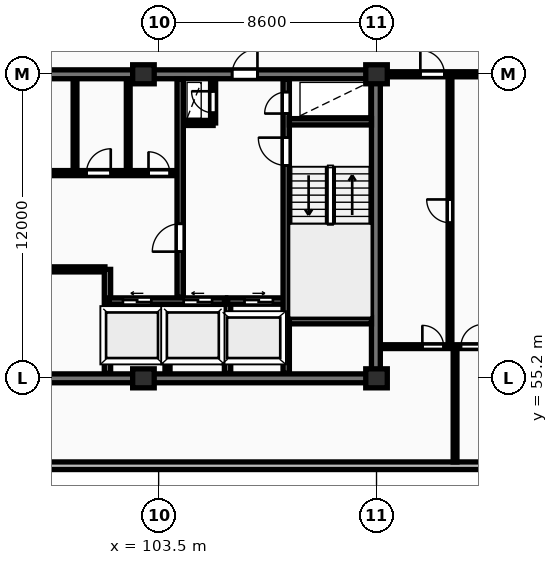
"""IFC4 building model, lengths in metres.
Left out: names, types, materials, properties, quantities, classifications, styles, units other than length and angle.
Written with IfcOpenShell. Run it as: python <this file> out.ifc"""

import sys

from ifc_helpers import new_model, si_unit, direction, frame, frame_2d, origin, origin_2d, place, context, subcontext, project, spatial, rectangle, extrude, element, fill, save


model = new_model("IFC4")
c1 = context("Model", 3, precision=1e-05, world=origin(), true_north=direction((0.0, 1.0)))
c2 = subcontext(c1, "Body", "Model", "MODEL_VIEW")
j1 = project(units=[si_unit("LENGTHUNIT", "METRE"), si_unit("PLANEANGLEUNIT", "RADIAN")], contexts=[c1])
p1 = place(None, origin())
s1 = spatial("IfcSite", under=j1, at=p1, CompositionType="ELEMENT")
p2 = place(p1, origin())
s2 = spatial("IfcBuilding", under=s1, at=p2, CompositionType="ELEMENT")
p3 = place(p2, frame((0.0, 0.0, 210.85)))
s3 = spatial("IfcBuildingStorey", under=s2, at=p3, CompositionType="ELEMENT", Elevation=210.85)
for number, where, z_axis, x_axis in (
    (1, (102.9, 55.2, 0.0), (0.0, 0.0, 1.0), (1.0, 0.0, 0.0)),
    (2, (102.9, 67.2, 0.0), (0.0, 0.0, 1.0), (1.0, 0.0, 0.0)),
    (3, (112.1, 55.2, 0.0), (0.0, 0.0, 1.0), (1.0, 0.0, 0.0)),
    (4, (112.1, 67.2, 0.0), (0.0, 0.0, 1.0), (1.0, 0.0, 0.0)),
):
    element("IfcColumn", number, at=place(p3, frame(where, z_axis=z_axis, x_axis=x_axis)), inside=s3, PredefinedType="COLUMN", context=c2, shape_type="SweptSolid", body=[
        extrude(rectangle(XDim=0.85, YDim=0.75, at=origin_2d()), origin(), (0.0, 0.0, 1.0), 3.25),
    ])
p4 = place(p3, frame((59.8, 51.75, 0.0), z_axis=(0.0, 0.0, 1.0), x_axis=(1.0, 0.0, 0.0)))
e5 = element("IfcWall", 5, at=p4, inside=s3, PredefinedType="STANDARD", context=c2, shape_type="SweptSolid", body=[
    extrude(rectangle(XDim=68.6, YDim=0.3, at=frame_2d((34.3, 0.0))), origin(), (0.0, 0.0, 1.0), 2.97),
])
p5 = place(p4, frame((13.025, 0.0, 0.85)))
e6 = element("IfcOpeningElement", 6, at=p5, cuts=e5, PredefinedType="OPENING", context=c2, shape_type="SweptSolid", body=[
    extrude(rectangle(XDim=1.8, YDim=1.8, at=frame_2d((0.9, 0.9))), frame((0.0, 0.16, 0.0), z_axis=(0.0, -1.0, 0.0), x_axis=(1.0, 0.0, 0.0)), (0.0, 0.0, 1.0), 0.32),
])
p6 = place(p4, frame((56.375, 0.0, 0.85)))
e7 = element("IfcOpeningElement", 7, at=p6, cuts=e5, PredefinedType="OPENING", context=c2, shape_type="SweptSolid", body=[
    extrude(rectangle(XDim=1.8, YDim=1.8, at=frame_2d((0.9, 0.9))), frame((0.0, 0.16, 0.0), z_axis=(0.0, -1.0, 0.0), x_axis=(1.0, 0.0, 0.0)), (0.0, 0.0, 1.0), 0.32),
])
p7 = place(p3, frame((75.95, 55.2, 0.0), z_axis=(0.0, 0.0, 1.0), x_axis=(1.0, 0.0, 0.0)))
e8 = element("IfcWall", 8, at=p7, inside=s3, PredefinedType="SHEAR", context=c2, shape_type="SweptSolid", body=[
    extrude(rectangle(XDim=36.3, YDim=0.35, at=frame_2d((18.15, 0.0))), origin(), (0.0, 0.0, 1.0), 3.25),
])
p8 = place(p3, frame((112.075, 55.375, 0.0), z_axis=(0.0, 0.0, 1.0), x_axis=(0.0, 1.0, 0.0)))
e9 = element("IfcWall", 9, at=p8, inside=s3, PredefinedType="SHEAR", context=c2, shape_type="SweptSolid", body=[
    extrude(rectangle(XDim=11.65, YDim=0.35, at=frame_2d((5.825, 0.0))), origin(), (0.0, 0.0, 1.0), 3.25),
])
p9 = place(p3, frame((75.95, 67.2, 0.0), z_axis=(0.0, 0.0, 1.0), x_axis=(1.0, 0.0, 0.0)))
e10 = element("IfcWall", 10, at=p9, inside=s3, PredefinedType="SHEAR", context=c2, shape_type="SweptSolid", body=[
    extrude(rectangle(XDim=36.3, YDim=0.35, at=frame_2d((18.15, 0.0))), origin(), (0.0, 0.0, 1.0), 3.25),
])
p10 = place(p9, frame((5.25, 0.0, 0.0)))
e11 = element("IfcOpeningElement", 11, at=p10, cuts=e10, PredefinedType="OPENING", context=c2, shape_type="SweptSolid", body=[
    extrude(rectangle(XDim=1.0, YDim=2.15, at=frame_2d((0.5, 1.075))), frame((0.0, 0.185, 0.0), z_axis=(0.0, -1.0, 0.0), x_axis=(1.0, 0.0, 0.0)), (0.0, 0.0, 1.0), 0.37),
])
p11 = place(p9, frame((21.6, 0.0, 0.0)))
e12 = element("IfcOpeningElement", 12, at=p11, cuts=e10, PredefinedType="OPENING", context=c2, shape_type="SweptSolid", body=[
    extrude(rectangle(XDim=1.5, YDim=2.2, at=frame_2d((0.75, 1.1))), frame((0.0, 0.185, 0.0), z_axis=(0.0, -1.0, 0.0), x_axis=(1.0, 0.0, 0.0)), (0.0, 0.0, 1.0), 0.37),
])
p12 = place(p9, frame((30.45, 0.0, 0.0)))
e13 = element("IfcOpeningElement", 13, at=p12, cuts=e10, PredefinedType="OPENING", context=c2, shape_type="SweptSolid", body=[
    extrude(rectangle(XDim=1.0, YDim=2.15, at=frame_2d((0.5, 1.075))), frame((0.0, 0.185, 0.0), z_axis=(0.0, -1.0, 0.0), x_axis=(1.0, 0.0, 0.0)), (0.0, 0.0, 1.0), 0.37),
])
p13 = place(p3, frame((93.02, 59.5, 0.0), z_axis=(0.0, 0.0, 1.0), x_axis=(1.0, 0.0, 0.0)))
e14 = element("IfcWall", 14, at=p13, inside=s3, PredefinedType="PARTITIONING", context=c2, shape_type="SweptSolid", body=[
    extrude(rectangle(XDim=8.36, YDim=0.2, at=frame_2d((4.18, 0.0))), origin(), (0.0, 0.0, 1.0), 2.97),
])
p14 = place(p13, frame((3.4, 0.0, 0.0)))
e15 = element("IfcOpeningElement", 15, at=p14, cuts=e14, PredefinedType="OPENING", context=c2, shape_type="SweptSolid", body=[
    extrude(rectangle(XDim=0.92, YDim=2.08, at=frame_2d((0.46, 1.04))), frame((0.0, 0.11, 0.0), z_axis=(0.0, -1.0, 0.0), x_axis=(1.0, 0.0, 0.0)), (0.0, 0.0, 1.0), 0.22),
])
p15 = place(p3, frame((101.48, 55.4, 0.0), z_axis=(0.0, 0.0, 1.0), x_axis=(0.0, 1.0, 0.0)))
e16 = element("IfcWall", 16, at=p15, inside=s3, PredefinedType="SHEAR", context=c2, shape_type="SweptSolid", body=[
    extrude(rectangle(XDim=4.1, YDim=0.25, at=frame_2d((2.05, 0.0))), origin(), (0.0, 0.0, 1.0), 3.25),
])
p16 = place(p3, frame((103.85, 55.4, 0.0), z_axis=(0.0, 0.0, 1.0), x_axis=(0.0, 1.0, 0.0)))
e17 = element("IfcWall", 17, at=p16, inside=s3, PredefinedType="PARTITIONING", context=c2, shape_type="SweptSolid", body=[
    extrude(rectangle(XDim=2.72, YDim=0.2, at=frame_2d((1.36, 0.0))), origin(), (0.0, 0.0, 1.0), 2.97),
])
p17 = place(p3, frame((101.55, 58.25, 0.0), z_axis=(0.0, 0.0, 1.0), x_axis=(1.0, 0.0, 0.0)))
e18 = element("IfcWall", 18, at=p17, inside=s3, PredefinedType="SHEAR", context=c2, shape_type="SweptSolid", body=[
    extrude(rectangle(XDim=4.6, YDim=0.25, at=frame_2d((2.3, 0.0))), origin(), (0.0, 0.0, 1.0), 3.25),
])
p18 = place(p17, frame((0.54, 0.0, 0.0)))
e19 = element("IfcOpeningElement", 19, at=p18, cuts=e18, PredefinedType="OPENING", context=c2, shape_type="SweptSolid", body=[
    extrude(rectangle(XDim=1.12, YDim=2.12, at=frame_2d((0.56, 1.06))), frame((0.0, 0.135, 0.0), z_axis=(0.0, -1.0, 0.0), x_axis=(1.0, 0.0, 0.0)), (0.0, 0.0, 1.0), 0.27),
])
p19 = place(p17, frame((2.94, 0.0, 0.0)))
e20 = element("IfcOpeningElement", 20, at=p19, cuts=e18, PredefinedType="OPENING", context=c2, shape_type="SweptSolid", body=[
    extrude(rectangle(XDim=1.12, YDim=2.12, at=frame_2d((0.56, 1.06))), frame((0.0, 0.135, 0.0), z_axis=(0.0, -1.0, 0.0), x_axis=(1.0, 0.0, 0.0)), (0.0, 0.0, 1.0), 0.27),
])
p20 = place(p3, frame((106.22, 55.4, 0.0), z_axis=(0.0, 0.0, 1.0), x_axis=(0.0, 1.0, 0.0)))
e21 = element("IfcWall", 21, at=p20, inside=s3, PredefinedType="SHEAR", context=c2, shape_type="SweptSolid", body=[
    extrude(rectangle(XDim=2.85, YDim=0.25, at=frame_2d((1.425, 0.0))), origin(), (0.0, 0.0, 1.0), 3.25),
])
p21 = place(p3, frame((106.22, 58.25, 0.0), z_axis=(0.0, 0.0, 1.0), x_axis=(1.0, 0.0, 0.0)))
e22 = element("IfcWall", 22, at=p21, inside=s3, PredefinedType="SHEAR", context=c2, shape_type="SweptSolid", body=[
    extrude(rectangle(XDim=2.46, YDim=0.25, at=frame_2d((1.23, 0.0))), origin(), (0.0, 0.0, 1.0), 3.25),
])
p22 = place(p21, frame((0.67, 0.0, 0.0)))
e23 = element("IfcOpeningElement", 23, at=p22, cuts=e22, PredefinedType="OPENING", context=c2, shape_type="SweptSolid", body=[
    extrude(rectangle(XDim=1.12, YDim=2.12, at=frame_2d((0.56, 1.06))), frame((0.0, 0.135, 0.0), z_axis=(0.0, -1.0, 0.0), x_axis=(1.0, 0.0, 0.0)), (0.0, 0.0, 1.0), 0.27),
])
for number, where, z_axis, x_axis in (
    (24, (102.3, 63.4, 0.0), (0.0, 0.0, 1.0), (0.0, 1.0, 0.0)),
    (25, (100.2, 63.4, 0.0), (0.0, 0.0, 1.0), (0.0, 1.0, 0.0)),
):
    element("IfcWall", number, at=place(p3, frame(where, z_axis=z_axis, x_axis=x_axis)), inside=s3, PredefinedType="PARTITIONING", context=c2, shape_type="SweptSolid", body=[
        extrude(rectangle(XDim=3.6, YDim=0.15, at=frame_2d((1.8, 0.0))), origin(), (0.0, 0.0, 1.0), 2.97),
    ])
p23 = place(p3, frame((84.42, 63.3, 0.0), z_axis=(0.0, 0.0, 1.0), x_axis=(1.0, 0.0, 0.0)))
e26 = element("IfcWall", 26, at=p23, inside=s3, PredefinedType="PARTITIONING", context=c2, shape_type="SweptSolid", body=[
    extrude(rectangle(XDim=19.83, YDim=0.2, at=frame_2d((9.915, 0.0))), origin(), (0.0, 0.0, 1.0), 2.97),
])
p24 = place(p23, frame((1.15, 0.0, 0.0)))
e27 = element("IfcOpeningElement", 27, at=p24, cuts=e26, PredefinedType="OPENING", context=c2, shape_type="SweptSolid", body=[
    extrude(rectangle(XDim=0.85, YDim=2.05, at=frame_2d((0.425, 1.025))), frame((0.0, 0.11, 0.0), z_axis=(0.0, -1.0, 0.0), x_axis=(1.0, 0.0, 0.0)), (0.0, 0.0, 1.0), 0.22),
])
p25 = place(p23, frame((3.25, 0.0, 0.0)))
e28 = element("IfcOpeningElement", 28, at=p25, cuts=e26, PredefinedType="OPENING", context=c2, shape_type="SweptSolid", body=[
    extrude(rectangle(XDim=0.85, YDim=2.05, at=frame_2d((0.425, 1.025))), frame((0.0, 0.11, 0.0), z_axis=(0.0, -1.0, 0.0), x_axis=(1.0, 0.0, 0.0)), (0.0, 0.0, 1.0), 0.22),
])
p26 = place(p23, frame((13.08, 0.0, 0.0)))
e29 = element("IfcOpeningElement", 29, at=p26, cuts=e26, PredefinedType="OPENING", context=c2, shape_type="SweptSolid", body=[
    extrude(rectangle(XDim=1.5, YDim=2.2, at=frame_2d((0.75, 1.1))), frame((0.0, 0.11, 0.0), z_axis=(0.0, -1.0, 0.0), x_axis=(1.0, 0.0, 0.0)), (0.0, 0.0, 1.0), 0.22),
])
p27 = place(p23, frame((5.53, 0.0, 0.0)))
e30 = element("IfcOpeningElement", 30, at=p27, cuts=e26, PredefinedType="OPENING", context=c2, shape_type="SweptSolid", body=[
    extrude(rectangle(XDim=0.88, YDim=2.06, at=frame_2d((0.44, 1.03))), frame((0.0, 0.11, 0.0), z_axis=(0.0, -1.0, 0.0), x_axis=(1.0, 0.0, 0.0)), (0.0, 0.0, 1.0), 0.22),
])
p28 = place(p23, frame((7.68, 0.0, 0.0)))
e31 = element("IfcOpeningElement", 31, at=p28, cuts=e26, PredefinedType="OPENING", context=c2, shape_type="SweptSolid", body=[
    extrude(rectangle(XDim=0.88, YDim=2.06, at=frame_2d((0.44, 1.03))), frame((0.0, 0.11, 0.0), z_axis=(0.0, -1.0, 0.0), x_axis=(1.0, 0.0, 0.0)), (0.0, 0.0, 1.0), 0.22),
])
p29 = place(p23, frame((10.43, 0.0, 0.0)))
e32 = element("IfcOpeningElement", 32, at=p29, cuts=e26, PredefinedType="OPENING", context=c2, shape_type="SweptSolid", body=[
    extrude(rectangle(XDim=0.85, YDim=2.05, at=frame_2d((0.425, 1.025))), frame((0.0, 0.11, 0.0), z_axis=(0.0, -1.0, 0.0), x_axis=(1.0, 0.0, 0.0)), (0.0, 0.0, 1.0), 0.22),
])
p30 = place(p23, frame((16.23, 0.0, 0.0)))
e33 = element("IfcOpeningElement", 33, at=p30, cuts=e26, PredefinedType="OPENING", context=c2, shape_type="SweptSolid", body=[
    extrude(rectangle(XDim=0.96, YDim=2.1, at=frame_2d((0.48, 1.05))), frame((0.0, 0.11, 0.0), z_axis=(0.0, -1.0, 0.0), x_axis=(1.0, 0.0, 0.0)), (0.0, 0.0, 1.0), 0.22),
])
p31 = place(p23, frame((18.68, 0.0, 0.0)))
e34 = element("IfcOpeningElement", 34, at=p31, cuts=e26, PredefinedType="OPENING", context=c2, shape_type="SweptSolid", body=[
    extrude(rectangle(XDim=0.84, YDim=2.04, at=frame_2d((0.42, 1.02))), frame((0.0, 0.11, 0.0), z_axis=(0.0, -1.0, 0.0), x_axis=(1.0, 0.0, 0.0)), (0.0, 0.0, 1.0), 0.22),
])
p32 = place(p3, frame((104.45, 65.28, 0.0), z_axis=(0.0, 0.0, 1.0), x_axis=(1.0, 0.0, 0.0)))
e35 = element("IfcWall", 35, at=p32, inside=s3, PredefinedType="PARTITIONING", context=c2, shape_type="SweptSolid", body=[
    extrude(rectangle(XDim=1.2, YDim=0.2, at=frame_2d((0.6, 0.0))), origin(), (0.0, 0.0, 1.0), 2.97),
])
p33 = place(p3, frame((105.65, 65.28, 0.0), z_axis=(0.0, 0.0, 1.0), x_axis=(0.0, 1.0, 0.0)))
e36 = element("IfcWall", 36, at=p33, inside=s3, PredefinedType="PARTITIONING", context=c2, shape_type="SweptSolid", body=[
    extrude(rectangle(XDim=1.72, YDim=0.2, at=frame_2d((0.86, 0.0))), origin(), (0.0, 0.0, 1.0), 2.97),
])
p34 = place(p33, frame((0.4, 0.0, 0.0)))
e37 = element("IfcOpeningElement", 37, at=p34, cuts=e36, PredefinedType="OPENING", context=c2, shape_type="SweptSolid", body=[
    extrude(rectangle(XDim=0.85, YDim=2.05, at=frame_2d((0.425, 1.025))), frame((0.0, 0.11, 0.0), z_axis=(0.0, -1.0, 0.0), x_axis=(1.0, 0.0, 0.0)), (0.0, 0.0, 1.0), 0.22),
])
p35 = place(p3, frame((104.35, 58.4, 0.0), z_axis=(0.0, 0.0, 1.0), x_axis=(0.0, 1.0, 0.0)))
e38 = element("IfcWall", 38, at=p35, inside=s3, PredefinedType="SHEAR", context=c2, shape_type="SweptSolid", body=[
    extrude(rectangle(XDim=8.6, YDim=0.25, at=frame_2d((4.3, 0.0))), origin(), (0.0, 0.0, 1.0), 3.25),
])
p36 = place(p35, frame((1.8, 0.0, 0.0)))
e39 = element("IfcOpeningElement", 39, at=p36, cuts=e38, PredefinedType="OPENING", context=c2, shape_type="SweptSolid", body=[
    extrude(rectangle(XDim=1.1, YDim=2.1, at=frame_2d((0.55, 1.05))), frame((0.0, 0.135, 0.0), z_axis=(0.0, -1.0, 0.0), x_axis=(1.0, 0.0, 0.0)), (0.0, 0.0, 1.0), 0.27),
])
p37 = place(p3, frame((108.535, 55.4, 0.0), z_axis=(0.0, 0.0, 1.0), x_axis=(0.0, 1.0, 0.0)))
e40 = element("IfcWall", 40, at=p37, inside=s3, PredefinedType="SHEAR", context=c2, shape_type="SweptSolid", body=[
    extrude(rectangle(XDim=11.6, YDim=0.25, at=frame_2d((5.8, 0.0))), origin(), (0.0, 0.0, 1.0), 3.25),
])
p38 = place(p37, frame((8.2, 0.0, 0.0)))
e41 = element("IfcOpeningElement", 41, at=p38, cuts=e40, PredefinedType="OPENING", context=c2, shape_type="SweptSolid", body=[
    extrude(rectangle(XDim=1.1, YDim=2.1, at=frame_2d((0.55, 1.05))), frame((0.0, 0.135, 0.0), z_axis=(0.0, -1.0, 0.0), x_axis=(1.0, 0.0, 0.0)), (0.0, 0.0, 1.0), 0.27),
])
p39 = place(p37, frame((10.25, 0.0, 0.0)))
e42 = element("IfcOpeningElement", 42, at=p39, cuts=e40, PredefinedType="OPENING", context=c2, shape_type="SweptSolid", body=[
    extrude(rectangle(XDim=0.85, YDim=2.05, at=frame_2d((0.425, 1.025))), frame((0.0, 0.135, 0.0), z_axis=(0.0, -1.0, 0.0), x_axis=(1.0, 0.0, 0.0)), (0.0, 0.0, 1.0), 0.27),
])
for number, where, z_axis, x_axis in (
    (43, (108.66, 57.475, 0.0), (0.0, 0.0, 1.0), (1.0, 0.0, 0.0)),
    (44, (108.66, 65.325, 0.0), (0.0, 0.0, 1.0), (1.0, 0.0, 0.0)),
):
    element("IfcWall", number, at=place(p3, frame(where, z_axis=z_axis, x_axis=x_axis)), inside=s3, PredefinedType="SHEAR", context=c2, shape_type="SweptSolid", body=[
        extrude(rectangle(XDim=3.24, YDim=0.25, at=frame_2d((1.62, 0.0))), origin(), (0.0, 0.0, 1.0), 3.25),
    ])
p40 = place(p3, frame((115.0, 56.45, 0.0), z_axis=(0.0, 0.0, 1.0), x_axis=(0.0, 1.0, 0.0)))
e45 = element("IfcWall", 45, at=p40, inside=s3, PredefinedType="PARTITIONING", context=c2, shape_type="SweptSolid", body=[
    extrude(rectangle(XDim=10.7, YDim=0.15, at=frame_2d((5.35, 0.0))), origin(), (0.0, 0.0, 1.0), 2.97),
])
p41 = place(p40, frame((4.89, 0.0, 0.0)))
e46 = element("IfcOpeningElement", 46, at=p41, cuts=e45, PredefinedType="OPENING", context=c2, shape_type="SweptSolid", body=[
    extrude(rectangle(XDim=0.92, YDim=2.08, at=frame_2d((0.46, 1.04))), frame((0.0, 0.085, 0.0), z_axis=(0.0, -1.0, 0.0), x_axis=(1.0, 0.0, 0.0)), (0.0, 0.0, 1.0), 0.17),
])
p42 = place(p3, frame((115.2, 51.9, 0.0), z_axis=(0.0, 0.0, 1.0), x_axis=(0.0, 1.0, 0.0)))
e47 = element("IfcWall", 47, at=p42, inside=s3, PredefinedType="PARTITIONING", context=c2, shape_type="SweptSolid", body=[
    extrude(rectangle(XDim=4.55, YDim=0.15, at=frame_2d((2.275, 0.0))), origin(), (0.0, 0.0, 1.0), 2.97),
])
p43 = place(p3, frame((112.27, 56.45, 0.0), z_axis=(0.0, 0.0, 1.0), x_axis=(1.0, 0.0, 0.0)))
e48 = element("IfcWall", 48, at=p43, inside=s3, PredefinedType="PARTITIONING", context=c2, shape_type="SweptSolid", body=[
    extrude(rectangle(XDim=6.76, YDim=0.15, at=frame_2d((3.38, 0.0))), origin(), (0.0, 0.0, 1.0), 2.97),
])
p44 = place(p43, frame((1.64, 0.0, 0.0)))
e49 = element("IfcOpeningElement", 49, at=p44, cuts=e48, PredefinedType="OPENING", context=c2, shape_type="SweptSolid", body=[
    extrude(rectangle(XDim=0.84, YDim=2.04, at=frame_2d((0.42, 1.02))), frame((0.0, 0.085, 0.0), z_axis=(0.0, -1.0, 0.0), x_axis=(1.0, 0.0, 0.0)), (0.0, 0.0, 1.0), 0.17),
])
p45 = place(p43, frame((3.16, 0.0, 0.0)))
e50 = element("IfcOpeningElement", 50, at=p45, cuts=e48, PredefinedType="OPENING", context=c2, shape_type="SweptSolid", body=[
    extrude(rectangle(XDim=0.88, YDim=2.06, at=frame_2d((0.44, 1.03))), frame((0.0, 0.085, 0.0), z_axis=(0.0, -1.0, 0.0), x_axis=(1.0, 0.0, 0.0)), (0.0, 0.0, 1.0), 0.17),
])
p46 = place(p3, frame((112.25, 67.2, 0.0), z_axis=(0.0, 0.0, 1.0), x_axis=(1.0, 0.0, 0.0)))
e51 = element("IfcWall", 51, at=p46, inside=s3, PredefinedType="PARTITIONING", context=c2, shape_type="SweptSolid", body=[
    extrude(rectangle(XDim=16.15, YDim=0.2, at=frame_2d((8.075, 0.0))), origin(), (0.0, 0.0, 1.0), 2.433),
])
p47 = place(p46, frame((1.58, 0.0, 0.0)))
e52 = element("IfcOpeningElement", 52, at=p47, cuts=e51, PredefinedType="OPENING", context=c2, shape_type="SweptSolid", body=[
    extrude(rectangle(XDim=0.95, YDim=2.15, at=frame_2d((0.475, 1.075))), frame((0.0, 0.11, 0.0), z_axis=(0.0, -1.0, 0.0), x_axis=(1.0, 0.0, 0.0)), (0.0, 0.0, 1.0), 0.22),
])
p48 = place(p12, origin())
e53 = element("IfcDoor", 53, at=p48, inside=s3, OperationType="SINGLE_SWING_RIGHT", PredefinedType="DOOR", context=c2, shape_type="SweptSolid", body=[
    extrude(rectangle(XDim=1.0, YDim=2.15, at=frame_2d((0.5, 1.075))), frame((0.0, 0.025, 0.0), z_axis=(0.0, -1.0, 0.0), x_axis=(1.0, 0.0, 0.0)), (0.0, 0.0, 1.0), 0.05),
])
fill(e13, e53)
p49 = place(p18, origin())
e54 = element("IfcDoor", 54, at=p49, inside=s3, OperationType="SLIDING_TO_LEFT", PredefinedType="DOOR", context=c2, shape_type="SweptSolid", body=[
    extrude(rectangle(XDim=1.12, YDim=2.12, at=frame_2d((0.56, 1.06))), frame((0.0, 0.025, 0.0), z_axis=(0.0, -1.0, 0.0), x_axis=(1.0, 0.0, 0.0)), (0.0, 0.0, 1.0), 0.05),
])
fill(e19, e54)
p50 = place(p19, origin())
e55 = element("IfcDoor", 55, at=p50, inside=s3, OperationType="SLIDING_TO_LEFT", PredefinedType="DOOR", context=c2, shape_type="SweptSolid", body=[
    extrude(rectangle(XDim=1.12, YDim=2.12, at=frame_2d((0.56, 1.06))), frame((0.0, 0.025, 0.0), z_axis=(0.0, -1.0, 0.0), x_axis=(1.0, 0.0, 0.0)), (0.0, 0.0, 1.0), 0.05),
])
fill(e20, e55)
p51 = place(p22, origin())
e56 = element("IfcDoor", 56, at=p51, inside=s3, OperationType="SLIDING_TO_RIGHT", PredefinedType="DOOR", context=c2, shape_type="SweptSolid", body=[
    extrude(rectangle(XDim=1.12, YDim=2.12, at=frame_2d((0.56, 1.06))), frame((0.0, 0.025, 0.0), z_axis=(0.0, -1.0, 0.0), x_axis=(1.0, 0.0, 0.0)), (0.0, 0.0, 1.0), 0.05),
])
fill(e23, e56)
p52 = place(p30, origin())
e57 = element("IfcDoor", 57, at=p52, inside=s3, OperationType="SINGLE_SWING_RIGHT", PredefinedType="DOOR", context=c2, shape_type="SweptSolid", body=[
    extrude(rectangle(XDim=0.96, YDim=2.1, at=frame_2d((0.48, 1.05))), frame((0.0, 0.025, 0.0), z_axis=(0.0, -1.0, 0.0), x_axis=(1.0, 0.0, 0.0)), (0.0, 0.0, 1.0), 0.05),
])
fill(e33, e57)
p53 = place(p31, origin())
e58 = element("IfcDoor", 58, at=p53, inside=s3, OperationType="SINGLE_SWING_LEFT", PredefinedType="DOOR", context=c2, shape_type="SweptSolid", body=[
    extrude(rectangle(XDim=0.84, YDim=2.04, at=frame_2d((0.42, 1.02))), frame((0.0, 0.025, 0.0), z_axis=(0.0, -1.0, 0.0), x_axis=(1.0, 0.0, 0.0)), (0.0, 0.0, 1.0), 0.05),
])
fill(e34, e58)
p54 = place(p34, origin())
e59 = element("IfcDoor", 59, at=p54, inside=s3, OperationType="SINGLE_SWING_RIGHT", PredefinedType="DOOR", context=c2, shape_type="SweptSolid", body=[
    extrude(rectangle(XDim=0.85, YDim=2.05, at=frame_2d((0.425, 1.025))), frame((0.0, 0.025, 0.0), z_axis=(0.0, -1.0, 0.0), x_axis=(1.0, 0.0, 0.0)), (0.0, 0.0, 1.0), 0.05),
])
fill(e37, e59)
p55 = place(p36, origin())
e60 = element("IfcDoor", 60, at=p55, inside=s3, OperationType="SINGLE_SWING_LEFT", PredefinedType="DOOR", context=c2, shape_type="SweptSolid", body=[
    extrude(rectangle(XDim=1.1, YDim=2.1, at=frame_2d((0.55, 1.05))), frame((0.0, 0.025, 0.0), z_axis=(0.0, -1.0, 0.0), x_axis=(1.0, 0.0, 0.0)), (0.0, 0.0, 1.0), 0.05),
])
fill(e39, e60)
p56 = place(p38, origin())
e61 = element("IfcDoor", 61, at=p56, inside=s3, OperationType="SINGLE_SWING_RIGHT", PredefinedType="DOOR", context=c2, shape_type="SweptSolid", body=[
    extrude(rectangle(XDim=1.1, YDim=2.1, at=frame_2d((0.55, 1.05))), frame((0.0, 0.025, 0.0), z_axis=(0.0, -1.0, 0.0), x_axis=(1.0, 0.0, 0.0)), (0.0, 0.0, 1.0), 0.05),
])
fill(e41, e61)
p57 = place(p39, origin())
e62 = element("IfcDoor", 62, at=p57, inside=s3, OperationType="SINGLE_SWING_LEFT", PredefinedType="DOOR", context=c2, shape_type="SweptSolid", body=[
    extrude(rectangle(XDim=0.85, YDim=2.05, at=frame_2d((0.425, 1.025))), frame((0.0, 0.025, 0.0), z_axis=(0.0, -1.0, 0.0), x_axis=(1.0, 0.0, 0.0)), (0.0, 0.0, 1.0), 0.05),
])
fill(e42, e62)
p58 = place(p41, origin())
e63 = element("IfcDoor", 63, at=p58, inside=s3, OperationType="SINGLE_SWING_RIGHT", PredefinedType="DOOR", context=c2, shape_type="SweptSolid", body=[
    extrude(rectangle(XDim=0.92, YDim=2.08, at=frame_2d((0.46, 1.04))), frame((0.0, 0.025, 0.0), z_axis=(0.0, -1.0, 0.0), x_axis=(1.0, 0.0, 0.0)), (0.0, 0.0, 1.0), 0.05),
])
fill(e46, e63)
p59 = place(p44, origin())
e64 = element("IfcDoor", 64, at=p59, inside=s3, OperationType="SINGLE_SWING_LEFT", PredefinedType="DOOR", context=c2, shape_type="SweptSolid", body=[
    extrude(rectangle(XDim=0.84, YDim=2.04, at=frame_2d((0.42, 1.02))), frame((0.0, 0.025, 0.0), z_axis=(0.0, -1.0, 0.0), x_axis=(1.0, 0.0, 0.0)), (0.0, 0.0, 1.0), 0.05),
])
fill(e49, e64)
p60 = place(p45, origin())
e65 = element("IfcDoor", 65, at=p60, inside=s3, OperationType="SINGLE_SWING_RIGHT", PredefinedType="DOOR", context=c2, shape_type="SweptSolid", body=[
    extrude(rectangle(XDim=0.88, YDim=2.06, at=frame_2d((0.44, 1.03))), frame((0.0, 0.025, 0.0), z_axis=(0.0, -1.0, 0.0), x_axis=(1.0, 0.0, 0.0)), (0.0, 0.0, 1.0), 0.05),
])
fill(e50, e65)
p61 = place(p47, origin())
e66 = element("IfcDoor", 66, at=p61, inside=s3, OperationType="SINGLE_SWING_LEFT", PredefinedType="DOOR", context=c2, shape_type="SweptSolid", body=[
    extrude(rectangle(XDim=0.95, YDim=2.15, at=frame_2d((0.475, 1.075))), frame((0.0, 0.025, 0.0), z_axis=(0.0, -1.0, 0.0), x_axis=(1.0, 0.0, 0.0)), (0.0, 0.0, 1.0), 0.05),
])
fill(e52, e66)
save(model, sys.argv[1])
